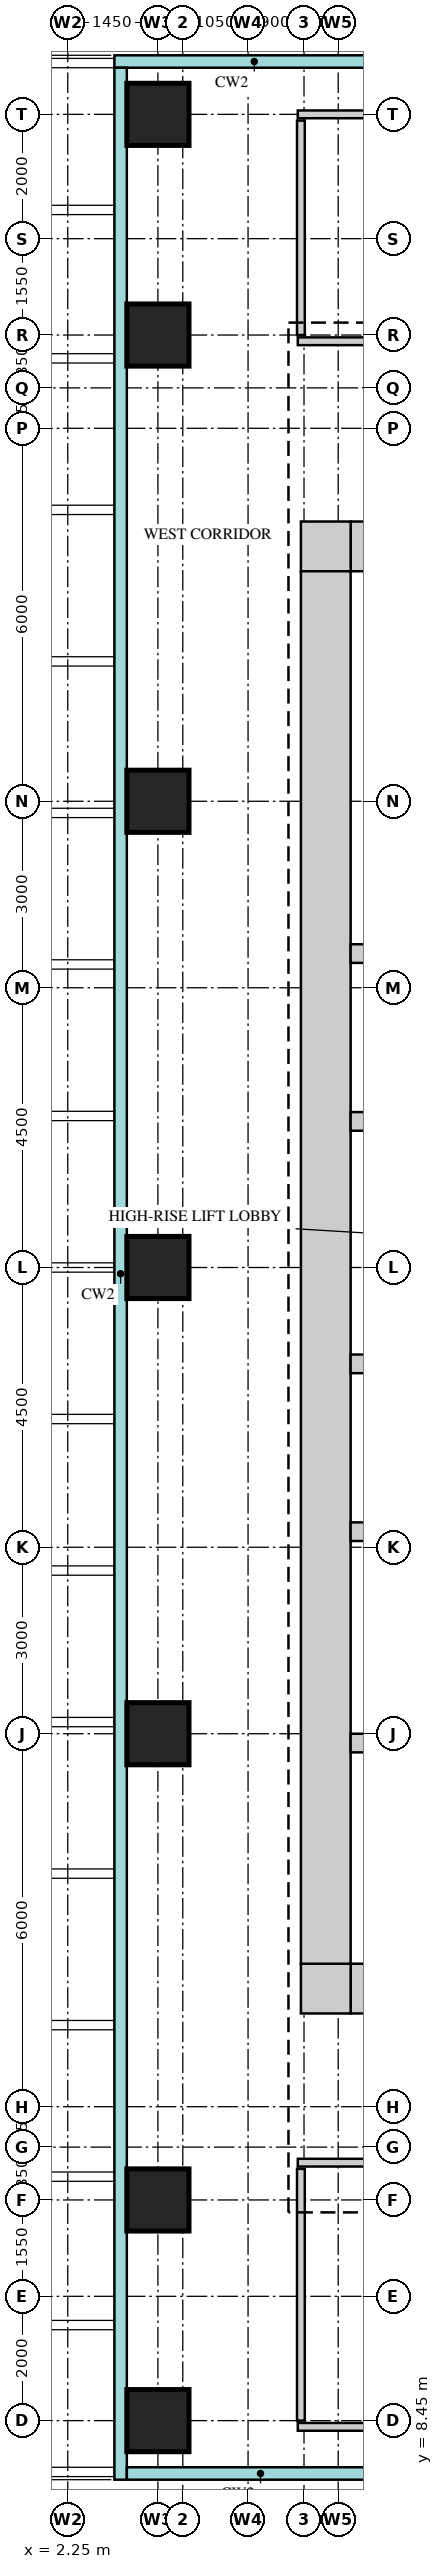
"""IFC4 building model, lengths in metres.
Left out: names, types, materials, properties, quantities, classifications, styles, units other than length and angle.
Written with IfcOpenShell. Run it as: python <this file> out.ifc"""

import sys

from ifc_helpers import new_model, si_unit, direction, frame, frame_2d, origin, origin_2d, place, context, subcontext, project, spatial, rectangle, extrude, source, transform, mapped, element, save


model = new_model("IFC4")
c1 = context("Model", 3, precision=1e-05, world=origin(), true_north=direction((0.0, 1.0)))
c2 = subcontext(c1, "Body", "Model", "MODEL_VIEW")
j1 = project(units=[si_unit("LENGTHUNIT", "METRE"), si_unit("PLANEANGLEUNIT", "RADIAN")], contexts=[c1])
p1 = place(None, origin())
s1 = spatial("IfcSite", under=j1, at=p1, CompositionType="ELEMENT")
p2 = place(p1, origin())
s2 = spatial("IfcBuilding", under=s1, at=p2, CompositionType="ELEMENT")
p3 = place(p2, frame((0.0, 0.0, 200.7)))
s3 = spatial("IfcBuildingStorey", under=s2, at=p3, CompositionType="ELEMENT", Elevation=200.7)
m1 = source(origin(), c2, "Body", "SweptSolid", [
    extrude(rectangle(XDim=13.4, YDim=0.8, at=frame_2d((6.7, 0.0))), origin(), (0.0, 0.0, 1.0), 3.75),
])
p4 = place(p3, frame((6.8, 38.6, 0.0), z_axis=(0.0, 0.0, 1.0), x_axis=(1.0, 0.0, 0.0)))
e1 = element("IfcWall", 1, at=p4, inside=s3, PredefinedType="SHEAR", context=c2, shape_type="MappedRepresentation", body=[
    mapped(m1, transform((0.0, 0.0, 0.0))),
])
m2 = source(origin(), c2, "Body", "SweptSolid", [
    extrude(rectangle(XDim=0.9, YDim=2.1, at=frame_2d((0.45, 1.05))), frame((0.0, 0.41, 0.0), z_axis=(0.0, -1.0, 0.0), x_axis=(1.0, 0.0, 0.0)), (0.0, 0.0, 1.0), 0.82),
])
p5 = place(p4, frame((1.8, 0.0, 0.0)))
e2 = element("IfcOpeningElement", 2, at=p5, cuts=e1, PredefinedType="OPENING", context=c2, shape_type="MappedRepresentation", body=[
    mapped(m2, transform((0.0, 0.0, 0.0))),
])
p6 = place(p4, frame((6.25, 0.0, 0.0)))
e3 = element("IfcOpeningElement", 3, at=p6, cuts=e1, PredefinedType="OPENING", context=c2, shape_type="MappedRepresentation", body=[
    mapped(m2, transform((0.0, 0.0, 0.0))),
])
p7 = place(p4, frame((10.7, 0.0, 0.0)))
e4 = element("IfcOpeningElement", 4, at=p7, cuts=e1, PredefinedType="OPENING", context=c2, shape_type="MappedRepresentation", body=[
    mapped(m2, transform((0.0, 0.0, 0.0))),
])
m3 = source(origin(), c2, "Body", "SweptSolid", [
    extrude(rectangle(XDim=0.8, YDim=0.8, at=frame_2d((0.4, 0.0))), origin(), (0.0, 0.0, 1.0), 3.75),
])
p8 = place(p3, frame((6.0, 38.6, 0.0), z_axis=(0.0, 0.0, 1.0), x_axis=(1.0, 0.0, 0.0)))
e5 = element("IfcWall", 5, at=p8, inside=s3, PredefinedType="SHEAR", context=c2, shape_type="MappedRepresentation", body=[
    mapped(m3, transform((0.0, 0.0, 0.0))),
])
p9 = place(p3, frame((6.8, 15.4, 0.0), z_axis=(0.0, 0.0, 1.0), x_axis=(1.0, 0.0, 0.0)))
e6 = element("IfcWall", 6, at=p9, inside=s3, PredefinedType="SHEAR", context=c2, shape_type="MappedRepresentation", body=[
    mapped(m1, transform((0.0, 0.0, 0.0))),
])
m4 = source(origin(), c2, "Body", "SweptSolid", [
    extrude(rectangle(XDim=1.2, YDim=2.1, at=frame_2d((0.6, 1.05))), frame((0.0, 0.41, 0.0), z_axis=(0.0, -1.0, 0.0), x_axis=(1.0, 0.0, 0.0)), (0.0, 0.0, 1.0), 0.82),
])
p10 = place(p9, frame((5.4, 0.0, 0.0)))
e7 = element("IfcOpeningElement", 7, at=p10, cuts=e6, PredefinedType="OPENING", context=c2, shape_type="MappedRepresentation", body=[
    mapped(m4, transform((0.0, 0.0, 0.0))),
])
p11 = place(p9, frame((2.05, 0.0, 0.0)))
e8 = element("IfcOpeningElement", 8, at=p11, cuts=e6, PredefinedType="OPENING", context=c2, shape_type="MappedRepresentation", body=[
    mapped(m4, transform((0.0, 0.0, 0.0))),
])
m5 = source(origin(), c2, "Body", "SweptSolid", [
    extrude(rectangle(XDim=1.0, YDim=2.1, at=frame_2d((0.5, 1.05))), frame((0.0, 0.41, 0.0), z_axis=(0.0, -1.0, 0.0), x_axis=(1.0, 0.0, 0.0)), (0.0, 0.0, 1.0), 0.82),
])
p12 = place(p9, frame((7.9, 0.0, 0.0)))
e9 = element("IfcOpeningElement", 9, at=p12, cuts=e6, PredefinedType="OPENING", context=c2, shape_type="MappedRepresentation", body=[
    mapped(m5, transform((0.0, 0.0, 0.0))),
])
p13 = place(p3, frame((6.0, 15.4, 0.0), z_axis=(0.0, 0.0, 1.0), x_axis=(1.0, 0.0, 0.0)))
e10 = element("IfcWall", 10, at=p13, inside=s3, PredefinedType="SHEAR", context=c2, shape_type="MappedRepresentation", body=[
    mapped(m3, transform((0.0, 0.0, 0.0))),
])
m6 = source(origin(), c2, "Body", "SweptSolid", [
    extrude(rectangle(XDim=22.4, YDim=0.8, at=frame_2d((11.2, 0.0))), origin(), (0.0, 0.0, 1.0), 3.75),
])
p14 = place(p3, frame((6.4, 15.8, 0.0), z_axis=(0.0, 0.0, 1.0), x_axis=(0.0, 1.0, 0.0)))
e11 = element("IfcWall", 11, at=p14, inside=s3, PredefinedType="SHEAR", context=c2, shape_type="MappedRepresentation", body=[
    mapped(m6, transform((0.0, 0.0, 0.0))),
])
m7 = source(origin(), c2, "Body", "SweptSolid", [
    extrude(rectangle(XDim=13.4, YDim=0.3, at=frame_2d((6.7, 0.0))), origin(), (0.0, 0.0, 1.0), 3.75),
])
p15 = place(p3, frame((6.8, 22.75, 0.0), z_axis=(0.0, 0.0, 1.0), x_axis=(1.0, 0.0, 0.0)))
e12 = element("IfcWall", 12, at=p15, inside=s3, PredefinedType="STANDARD", context=c2, shape_type="MappedRepresentation", body=[
    mapped(m7, transform((0.0, 0.0, 0.0))),
])
m8 = source(origin(), c2, "Body", "SweptSolid", [
    extrude(rectangle(XDim=9.275, YDim=0.3, at=frame_2d((4.637, 0.0))), origin(), (0.0, 0.0, 1.0), 3.75),
])
p16 = place(p3, frame((6.8, 19.35, 0.0), z_axis=(0.0, 0.0, 1.0), x_axis=(1.0, 0.0, 0.0)))
e13 = element("IfcWall", 13, at=p16, inside=s3, PredefinedType="STANDARD", context=c2, shape_type="MappedRepresentation", body=[
    mapped(m8, transform((0.0, 0.0, 0.0))),
])
m9 = source(origin(), c2, "Body", "SweptSolid", [
    extrude(rectangle(XDim=1.2, YDim=2.1, at=frame_2d((0.6, 1.05))), frame((0.0, 0.16, 0.0), z_axis=(0.0, -1.0, 0.0), x_axis=(1.0, 0.0, 0.0)), (0.0, 0.0, 1.0), 0.32),
])
p17 = place(p16, frame((0.85, 0.0, 0.0)))
e14 = element("IfcOpeningElement", 14, at=p17, cuts=e13, PredefinedType="OPENING", context=c2, shape_type="MappedRepresentation", body=[
    mapped(m9, transform((0.0, 0.0, 0.0))),
])
p18 = place(p16, frame((3.2, 0.0, 0.0)))
e15 = element("IfcOpeningElement", 15, at=p18, cuts=e13, PredefinedType="OPENING", context=c2, shape_type="MappedRepresentation", body=[
    mapped(m9, transform((0.0, 0.0, 0.0))),
])
p19 = place(p16, frame((5.45, 0.0, 0.0)))
e16 = element("IfcOpeningElement", 16, at=p19, cuts=e13, PredefinedType="OPENING", context=c2, shape_type="MappedRepresentation", body=[
    mapped(m9, transform((0.0, 0.0, 0.0))),
])
p20 = place(p16, frame((7.6, 0.0, 0.0)))
e17 = element("IfcOpeningElement", 17, at=p20, cuts=e13, PredefinedType="OPENING", context=c2, shape_type="MappedRepresentation", body=[
    mapped(m9, transform((0.0, 0.0, 0.0))),
])
p21 = place(p3, frame((6.8, 32.05, 0.0), z_axis=(0.0, 0.0, 1.0), x_axis=(1.0, 0.0, 0.0)))
e18 = element("IfcWall", 18, at=p21, inside=s3, PredefinedType="STANDARD", context=c2, shape_type="MappedRepresentation", body=[
    mapped(m7, transform((0.0, 0.0, 0.0))),
])
p22 = place(p3, frame((6.8, 29.35, 0.0), z_axis=(0.0, 0.0, 1.0), x_axis=(1.0, 0.0, 0.0)))
e19 = element("IfcWall", 19, at=p22, inside=s3, PredefinedType="STANDARD", context=c2, shape_type="MappedRepresentation", body=[
    mapped(m7, transform((0.0, 0.0, 0.0))),
])
p23 = place(p22, frame((0.95, 0.0, 0.0)))
e20 = element("IfcOpeningElement", 20, at=p23, cuts=e19, PredefinedType="OPENING", context=c2, shape_type="MappedRepresentation", body=[
    mapped(m9, transform((0.0, 0.0, 0.0))),
])
p24 = place(p22, frame((3.5, 0.0, 0.0)))
e21 = element("IfcOpeningElement", 21, at=p24, cuts=e19, PredefinedType="OPENING", context=c2, shape_type="MappedRepresentation", body=[
    mapped(m9, transform((0.0, 0.0, 0.0))),
])
p25 = place(p22, frame((6.05, 0.0, 0.0)))
e22 = element("IfcOpeningElement", 22, at=p25, cuts=e19, PredefinedType="OPENING", context=c2, shape_type="MappedRepresentation", body=[
    mapped(m9, transform((0.0, 0.0, 0.0))),
])
p26 = place(p22, frame((8.6, 0.0, 0.0)))
e23 = element("IfcOpeningElement", 23, at=p26, cuts=e19, PredefinedType="OPENING", context=c2, shape_type="MappedRepresentation", body=[
    mapped(m9, transform((0.0, 0.0, 0.0))),
])
p27 = place(p22, frame((11.15, 0.0, 0.0)))
e24 = element("IfcOpeningElement", 24, at=p27, cuts=e19, PredefinedType="OPENING", context=c2, shape_type="MappedRepresentation", body=[
    mapped(m9, transform((0.0, 0.0, 0.0))),
])
p28 = place(p3, frame((6.8, 25.45, 0.0), z_axis=(0.0, 0.0, 1.0), x_axis=(1.0, 0.0, 0.0)))
e25 = element("IfcWall", 25, at=p28, inside=s3, PredefinedType="STANDARD", context=c2, shape_type="MappedRepresentation", body=[
    mapped(m7, transform((0.0, 0.0, 0.0))),
])
p29 = place(p28, frame((0.95, 0.0, 0.0)))
e26 = element("IfcOpeningElement", 26, at=p29, cuts=e25, PredefinedType="OPENING", context=c2, shape_type="MappedRepresentation", body=[
    mapped(m9, transform((0.0, 0.0, 0.0))),
])
p30 = place(p28, frame((3.5, 0.0, 0.0)))
e27 = element("IfcOpeningElement", 27, at=p30, cuts=e25, PredefinedType="OPENING", context=c2, shape_type="MappedRepresentation", body=[
    mapped(m9, transform((0.0, 0.0, 0.0))),
])
p31 = place(p28, frame((6.05, 0.0, 0.0)))
e28 = element("IfcOpeningElement", 28, at=p31, cuts=e25, PredefinedType="OPENING", context=c2, shape_type="MappedRepresentation", body=[
    mapped(m9, transform((0.0, 0.0, 0.0))),
])
p32 = place(p28, frame((8.6, 0.0, 0.0)))
e29 = element("IfcOpeningElement", 29, at=p32, cuts=e25, PredefinedType="OPENING", context=c2, shape_type="MappedRepresentation", body=[
    mapped(m9, transform((0.0, 0.0, 0.0))),
])
p33 = place(p28, frame((11.15, 0.0, 0.0)))
e30 = element("IfcOpeningElement", 30, at=p33, cuts=e25, PredefinedType="OPENING", context=c2, shape_type="MappedRepresentation", body=[
    mapped(m9, transform((0.0, 0.0, 0.0))),
])
m10 = source(origin(), c2, "Body", "SweptSolid", [
    extrude(rectangle(XDim=1.0, YDim=1.0, at=origin_2d()), origin(), (0.0, 0.0, 1.0), 3.75),
])
for number, where, z_axis, x_axis in (
    (31, (3.7, 8.45, 0.0), (0.0, 0.0, 1.0), (1.0, 0.0, 0.0)),
    (32, (3.7, 12.0, 0.0), (0.0, 0.0, 1.0), (1.0, 0.0, 0.0)),
    (33, (3.7, 19.5, 0.0), (0.0, 0.0, 1.0), (1.0, 0.0, 0.0)),
    (34, (3.7, 27.0, 0.0), (0.0, 0.0, 1.0), (1.0, 0.0, 0.0)),
    (35, (3.7, 34.5, 0.0), (0.0, 0.0, 1.0), (1.0, 0.0, 0.0)),
    (36, (3.7, 42.0, 0.0), (0.0, 0.0, 1.0), (1.0, 0.0, 0.0)),
    (37, (3.7, 45.55, 0.0), (0.0, 0.0, 1.0), (1.0, 0.0, 0.0)),
):
    element("IfcColumn", number, at=place(p3, frame(where, z_axis=z_axis, x_axis=x_axis)), inside=s3, PredefinedType="COLUMN", context=c2, shape_type="MappedRepresentation", body=[
        mapped(m10, transform((0.0, 0.0, 0.0))),
    ])
m11 = source(origin(), c2, "Body", "SweptSolid", [
    extrude(rectangle(XDim=7.95, YDim=0.125, at=frame_2d((3.975, 0.0))), origin(), (0.0, 0.0, 1.0), 3.25),
])
p34 = place(p3, frame((5.95, 8.35, 0.0), z_axis=(0.0, 0.0, 1.0), x_axis=(1.0, 0.0, 0.0)))
e38 = element("IfcWall", 38, at=p34, inside=s3, PredefinedType="PARTITIONING", context=c2, shape_type="MappedRepresentation", body=[
    mapped(m11, transform((0.0, 0.0, 0.0))),
])
m12 = source(origin(), c2, "Body", "SweptSolid", [
    extrude(rectangle(XDim=0.9, YDim=2.1, at=frame_2d((0.45, 1.05))), frame((0.0, 0.073, 0.0), z_axis=(0.0, -1.0, 0.0), x_axis=(1.0, 0.0, 0.0)), (0.0, 0.0, 1.0), 0.145),
])
p35 = place(p34, frame((3.8, 0.0, 0.0)))
e39 = element("IfcOpeningElement", 39, at=p35, cuts=e38, PredefinedType="OPENING", context=c2, shape_type="MappedRepresentation", body=[
    mapped(m12, transform((0.0, 0.0, 0.0))),
])
m13 = source(origin(), c2, "Body", "SweptSolid", [
    extrude(rectangle(XDim=4.05, YDim=0.125, at=frame_2d((2.025, 0.0))), origin(), (0.0, 0.0, 1.0), 3.8),
])
p36 = place(p3, frame((6.0, 8.45, 0.0), z_axis=(0.0, 0.0, 1.0), x_axis=(0.0, 1.0, 0.0)))
e40 = element("IfcWall", 40, at=p36, inside=s3, PredefinedType="PARTITIONING", context=c2, shape_type="MappedRepresentation", body=[
    mapped(m13, transform((0.0, 0.0, 0.0))),
])
m14 = source(origin(), c2, "Body", "SweptSolid", [
    extrude(rectangle(XDim=8.0, YDim=0.125, at=frame_2d((4.0, 0.0))), origin(), (0.0, 0.0, 1.0), 3.8),
])
p37 = place(p3, frame((5.95, 12.6, 0.0), z_axis=(0.0, 0.0, 1.0), x_axis=(1.0, 0.0, 0.0)))
e41 = element("IfcWall", 41, at=p37, inside=s3, PredefinedType="PARTITIONING", context=c2, shape_type="MappedRepresentation", body=[
    mapped(m14, transform((0.0, 0.0, 0.0))),
])
m15 = source(origin(), c2, "Body", "SweptSolid", [
    extrude(rectangle(XDim=7.95, YDim=0.125, at=frame_2d((3.975, 0.0))), origin(), (0.0, 0.0, 1.0), 3.8),
])
p38 = place(p3, frame((5.95, 41.9, 0.0), z_axis=(0.0, 0.0, 1.0), x_axis=(1.0, 0.0, 0.0)))
e42 = element("IfcWall", 42, at=p38, inside=s3, PredefinedType="PARTITIONING", context=c2, shape_type="MappedRepresentation", body=[
    mapped(m15, transform((0.0, 0.0, 0.0))),
])
p39 = place(p38, frame((3.55, 0.0, 0.0)))
e43 = element("IfcOpeningElement", 43, at=p39, cuts=e42, PredefinedType="OPENING", context=c2, shape_type="MappedRepresentation", body=[
    mapped(m12, transform((0.0, 0.0, 0.0))),
])
m16 = source(origin(), c2, "Body", "SweptSolid", [
    extrude(rectangle(XDim=3.45, YDim=0.125, at=frame_2d((1.725, 0.0))), origin(), (0.0, 0.0, 1.0), 3.8),
])
p40 = place(p3, frame((6.0, 42.0, 0.0), z_axis=(0.0, 0.0, 1.0), x_axis=(0.0, 1.0, 0.0)))
e44 = element("IfcWall", 44, at=p40, inside=s3, PredefinedType="PARTITIONING", context=c2, shape_type="MappedRepresentation", body=[
    mapped(m16, transform((0.0, 0.0, 0.0))),
])
p41 = place(p3, frame((5.95, 45.55, 0.0), z_axis=(0.0, 0.0, 1.0), x_axis=(1.0, 0.0, 0.0)))
e45 = element("IfcWall", 45, at=p41, inside=s3, PredefinedType="PARTITIONING", context=c2, shape_type="MappedRepresentation", body=[
    mapped(m11, transform((0.0, 0.0, 0.0))),
])
save(model, sys.argv[1])
